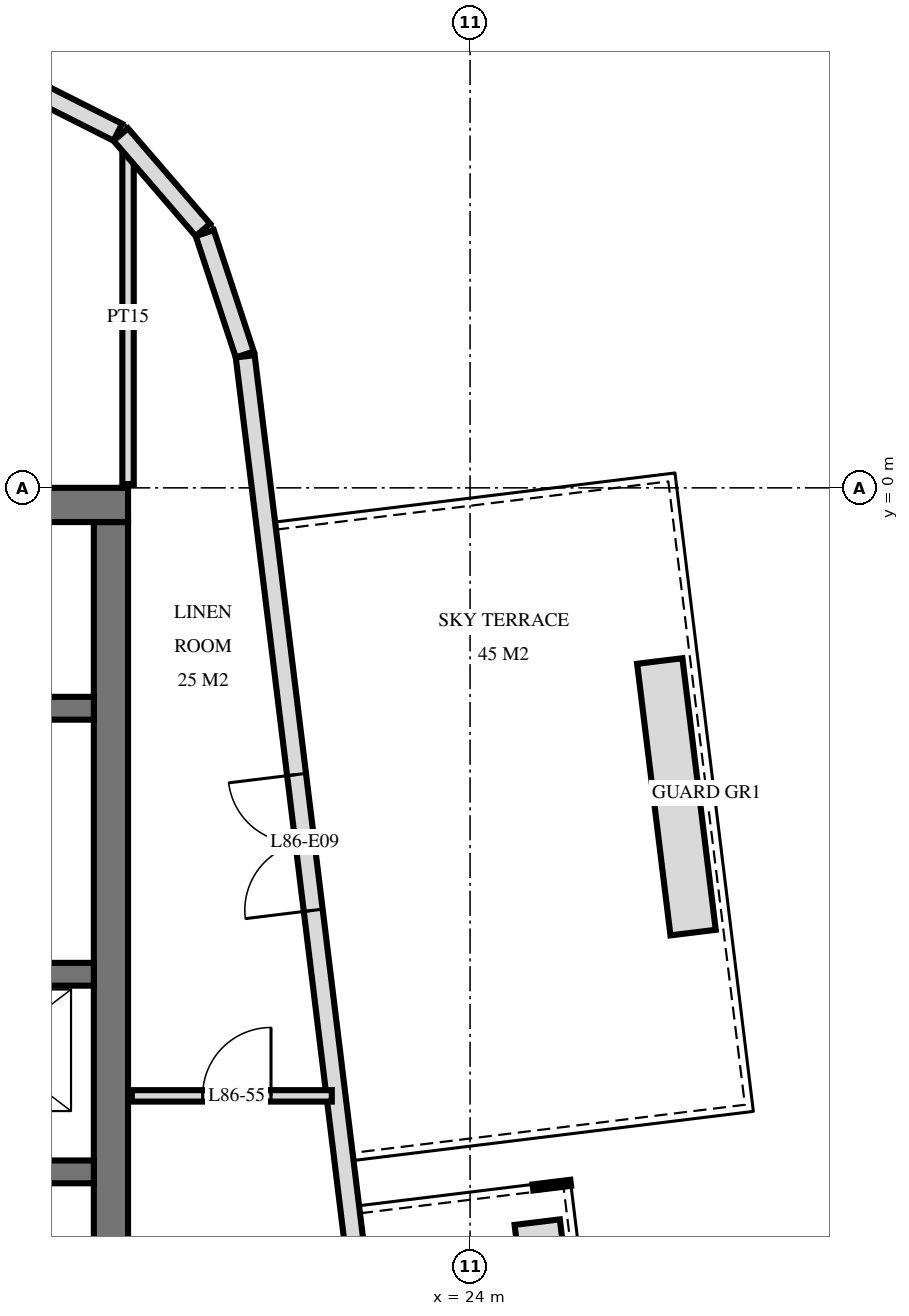
"""IFC4 building model, lengths in metres.
Left out: names, types, materials, properties, quantities, classifications, styles, units other than length and angle.
Written with IfcOpenShell. Run it as: python <this file> out.ifc"""

import sys

from ifc_helpers import new_model, si_unit, direction, frame, frame_2d, origin, place, context, subcontext, project, spatial, rectangle, extrude, element, fill, save


model = new_model("IFC4")
c1 = context("Model", 3, precision=1e-05, world=origin(), true_north=direction((0.0, 1.0)))
c2 = subcontext(c1, "Body", "Model", "MODEL_VIEW")
j1 = project(units=[si_unit("LENGTHUNIT", "METRE"), si_unit("PLANEANGLEUNIT", "RADIAN")], contexts=[c1])
p1 = place(None, origin())
s1 = spatial("IfcSite", under=j1, at=p1, CompositionType="ELEMENT")
p2 = place(p1, origin())
s2 = spatial("IfcBuilding", under=s1, at=p2, CompositionType="ELEMENT")
p3 = place(p2, frame((0.0, 0.0, 326.6)))
s3 = spatial("IfcBuildingStorey", under=s2, at=p3, CompositionType="ELEMENT", Elevation=326.6)
p4 = place(p3, frame((10.0, -0.225, 0.0), z_axis=(0.0, 0.0, 1.0), x_axis=(1.0, 0.0, 0.0)))
e1 = element("IfcWall", 1, at=p4, inside=s3, PredefinedType="SHEAR", context=c2, shape_type="SweptSolid", body=[
    extrude(rectangle(XDim=9.5, YDim=0.45, at=frame_2d((4.75, 0.0))), origin(), (0.0, 0.0, 1.0), 4.0),
])
p5 = place(p3, frame((19.275, -14.55, 0.0), z_axis=(0.0, 0.0, 1.0), x_axis=(0.0, 1.0, 0.0)))
e2 = element("IfcWall", 2, at=p5, inside=s3, PredefinedType="SHEAR", context=c2, shape_type="SweptSolid", body=[
    extrude(rectangle(XDim=14.1, YDim=0.45, at=frame_2d((7.05, 0.0))), origin(), (0.0, 0.0, 1.0), 4.0),
])
p6 = place(p3, frame((10.35, -2.9, 0.0), z_axis=(0.0, 0.0, 1.0), x_axis=(1.0, 0.0, 0.0)))
e3 = element("IfcWall", 3, at=p6, inside=s3, PredefinedType="SHEAR", context=c2, shape_type="SweptSolid", body=[
    extrude(rectangle(XDim=8.7, YDim=0.3, at=frame_2d((4.35, 0.0))), origin(), (0.0, 0.0, 1.0), 4.0),
])
p7 = place(p6, frame((0.8, 0.0, 0.0)))
e4 = element("IfcOpeningElement", 4, at=p7, cuts=e3, PredefinedType="OPENING", context=c2, shape_type="SweptSolid", body=[
    extrude(rectangle(XDim=1.1, YDim=2.1, at=frame_2d((0.55, 1.05))), frame((0.0, 0.16, 0.0), z_axis=(0.0, -1.0, 0.0), x_axis=(1.0, 0.0, 0.0)), (0.0, 0.0, 1.0), 0.32),
])
p8 = place(p6, frame((3.8, 0.0, 0.0)))
e5 = element("IfcOpeningElement", 5, at=p8, cuts=e3, PredefinedType="OPENING", context=c2, shape_type="SweptSolid", body=[
    extrude(rectangle(XDim=1.1, YDim=2.1, at=frame_2d((0.55, 1.05))), frame((0.0, 0.16, 0.0), z_axis=(0.0, -1.0, 0.0), x_axis=(1.0, 0.0, 0.0)), (0.0, 0.0, 1.0), 0.32),
])
p9 = place(p6, frame((6.9, 0.0, 0.0)))
e6 = element("IfcOpeningElement", 6, at=p9, cuts=e3, PredefinedType="OPENING", context=c2, shape_type="SweptSolid", body=[
    extrude(rectangle(XDim=0.9, YDim=2.1, at=frame_2d((0.45, 1.05))), frame((0.0, 0.16, 0.0), z_axis=(0.0, -1.0, 0.0), x_axis=(1.0, 0.0, 0.0)), (0.0, 0.0, 1.0), 0.32),
])
p10 = place(p3, frame((10.35, -6.4, 0.0), z_axis=(0.0, 0.0, 1.0), x_axis=(1.0, 0.0, 0.0)))
e7 = element("IfcWall", 7, at=p10, inside=s3, PredefinedType="SHEAR", context=c2, shape_type="SweptSolid", body=[
    extrude(rectangle(XDim=8.7, YDim=0.3, at=frame_2d((4.35, 0.0))), origin(), (0.0, 0.0, 1.0), 4.0),
])
p11 = place(p10, frame((6.8, 0.0, 0.0)))
e8 = element("IfcOpeningElement", 8, at=p11, cuts=e7, PredefinedType="OPENING", context=c2, shape_type="SweptSolid", body=[
    extrude(rectangle(XDim=1.1, YDim=2.1, at=frame_2d((0.55, 1.05))), frame((0.0, 0.16, 0.0), z_axis=(0.0, -1.0, 0.0), x_axis=(1.0, 0.0, 0.0)), (0.0, 0.0, 1.0), 0.32),
])
p12 = place(p3, frame((10.35, -9.0, 0.0), z_axis=(0.0, 0.0, 1.0), x_axis=(1.0, 0.0, 0.0)))
e9 = element("IfcWall", 9, at=p12, inside=s3, PredefinedType="SHEAR", context=c2, shape_type="SweptSolid", body=[
    extrude(rectangle(XDim=8.7, YDim=0.3, at=frame_2d((4.35, 0.0))), origin(), (0.0, 0.0, 1.0), 4.0),
])
p13 = place(p12, frame((3.8, 0.0, 0.0)))
e10 = element("IfcOpeningElement", 10, at=p13, cuts=e9, PredefinedType="OPENING", context=c2, shape_type="SweptSolid", body=[
    extrude(rectangle(XDim=1.1, YDim=2.1, at=frame_2d((0.55, 1.05))), frame((0.0, 0.16, 0.0), z_axis=(0.0, -1.0, 0.0), x_axis=(1.0, 0.0, 0.0)), (0.0, 0.0, 1.0), 0.32),
])
p14 = place(p3, frame((21.036, 1.755, 0.0), z_axis=(0.0, 0.0, 1.0), x_axis=(-0.313046160822, 0.949737911844, 0.0)))
e11 = element("IfcWall", 11, at=p14, inside=s3, PredefinedType="SOLIDWALL", context=c2, shape_type="SweptSolid", body=[
    extrude(rectangle(XDim=1.681, YDim=0.25, at=frame_2d((0.841, 0.0))), origin(), (0.0, 0.0, 1.0), 3.72),
])
for number, where, z_axis, x_axis in (
    (12, (20.485, 3.394, 0.0), (0.0, 0.0, 1.0), (-0.653, 0.758, 0.0)),
    (13, (19.366, 4.679, 0.0), (0.0, 0.0, 1.0), (-0.893, 0.45, 0.0)),
):
    element("IfcWall", number, at=place(p3, frame(where, z_axis=z_axis, x_axis=x_axis)), inside=s3, PredefinedType="SOLIDWALL", context=c2, shape_type="SweptSolid", body=[
        extrude(rectangle(XDim=1.656, YDim=0.25, at=frame_2d((0.828, 0.0))), origin(), (0.0, 0.0, 1.0), 3.72),
    ])
p15 = place(p3, frame((23.375, -17.277, 0.0), z_axis=(0.0, 0.0, 1.0), x_axis=(-0.121862878281, 0.992546945437, 0.0)))
e14 = element("IfcWall", 14, at=p15, inside=s3, PredefinedType="SOLIDWALL", context=c2, shape_type="SweptSolid", body=[
    extrude(rectangle(XDim=19.151, YDim=0.25, at=frame_2d((9.575, 0.0))), origin(), (0.0, 0.0, 1.0), 3.72),
])
p16 = place(p15, frame((2.479, 0.0, 0.0)))
e15 = element("IfcOpeningElement", 15, at=p16, cuts=e14, PredefinedType="OPENING", context=c2, shape_type="SweptSolid", body=[
    extrude(rectangle(XDim=1.8, YDim=2.4, at=frame_2d((0.9, 1.2))), frame((0.0, 0.135, 0.0), z_axis=(0.0, -1.0, 0.0), x_axis=(1.0, 0.0, 0.0)), (0.0, 0.0, 1.0), 0.27),
])
p17 = place(p15, frame((5.575, 0.0, 0.0)))
e16 = element("IfcOpeningElement", 16, at=p17, cuts=e14, PredefinedType="OPENING", context=c2, shape_type="SweptSolid", body=[
    extrude(rectangle(XDim=1.8, YDim=2.4, at=frame_2d((0.9, 1.2))), frame((0.0, 0.135, 0.0), z_axis=(0.0, -1.0, 0.0), x_axis=(1.0, 0.0, 0.0)), (0.0, 0.0, 1.0), 0.27),
])
p18 = place(p15, frame((11.807, 0.0, 0.0)))
e17 = element("IfcOpeningElement", 17, at=p18, cuts=e14, PredefinedType="OPENING", context=c2, shape_type="SweptSolid", body=[
    extrude(rectangle(XDim=1.8, YDim=2.4, at=frame_2d((0.9, 1.2))), frame((0.0, 0.135, 0.0), z_axis=(0.0, -1.0, 0.0), x_axis=(1.0, 0.0, 0.0)), (0.0, 0.0, 1.0), 0.27),
])
p19 = place(p3, frame((24.883, -9.662, 0.0), z_axis=(0.0, 0.0, 1.0), x_axis=(0.121830336845, -0.992550940267, 0.0)))
e18 = element("IfcWall", 18, at=p19, inside=s3, PredefinedType="USERDEFINED", context=c2, shape_type="SweptSolid", body=[
    extrude(rectangle(XDim=1.8, YDim=0.6, at=frame_2d((0.9, 0.0))), origin(), (0.0, 0.0, 1.0), 0.65),
])
p20 = place(p3, frame((26.496, -2.278, 0.0), z_axis=(0.0, 0.0, 1.0), x_axis=(0.121864343918, -0.992546765488, 0.0)))
e19 = element("IfcWall", 19, at=p20, inside=s3, PredefinedType="USERDEFINED", context=c2, shape_type="SweptSolid", body=[
    extrude(rectangle(XDim=3.6, YDim=0.6, at=frame_2d((1.8, 0.0))), origin(), (0.0, 0.0, 1.0), 0.65),
])
p21 = place(p3, frame((19.5, 0.05, 0.0), z_axis=(0.0, 0.0, 1.0), x_axis=(0.0, 1.0, 0.0)))
e20 = element("IfcWall", 20, at=p21, inside=s3, PredefinedType="PARTITIONING", context=c2, shape_type="SweptSolid", body=[
    extrude(rectangle(XDim=4.403, YDim=0.15, at=frame_2d((2.202, 0.0))), origin(), (0.0, 0.0, 1.0), 3.72),
])
p22 = place(p3, frame((19.55, -8.0, 0.0), z_axis=(0.0, 0.0, 1.0), x_axis=(1.0, 0.0, 0.0)))
e21 = element("IfcWall", 21, at=p22, inside=s3, PredefinedType="PARTITIONING", context=c2, shape_type="SweptSolid", body=[
    extrude(rectangle(XDim=2.631, YDim=0.15, at=frame_2d((1.315, 0.0))), origin(), (0.0, 0.0, 1.0), 3.253),
])
p23 = place(p22, frame((0.931, 0.0, 0.0)))
e22 = element("IfcOpeningElement", 22, at=p23, cuts=e21, PredefinedType="OPENING", context=c2, shape_type="SweptSolid", body=[
    extrude(rectangle(XDim=0.9, YDim=2.1, at=frame_2d((0.45, 1.05))), frame((0.0, 0.085, 0.0), z_axis=(0.0, -1.0, 0.0), x_axis=(1.0, 0.0, 0.0)), (0.0, 0.0, 1.0), 0.17),
])
p24 = place(p18, origin())
e23 = element("IfcDoor", 23, at=p24, inside=s3, OperationType="DOUBLE_DOOR_SINGLE_SWING", PredefinedType="DOOR", context=c2, shape_type="SweptSolid", body=[
    extrude(rectangle(XDim=1.8, YDim=2.4, at=frame_2d((0.9, 1.2))), frame((0.0, 0.025, 0.0), z_axis=(0.0, -1.0, 0.0), x_axis=(1.0, 0.0, 0.0)), (0.0, 0.0, 1.0), 0.05),
])
fill(e17, e23)
p25 = place(p23, origin())
e24 = element("IfcDoor", 24, at=p25, inside=s3, OperationType="SINGLE_SWING_LEFT", PredefinedType="DOOR", context=c2, shape_type="SweptSolid", body=[
    extrude(rectangle(XDim=0.9, YDim=2.1, at=frame_2d((0.45, 1.05))), frame((0.0, 0.025, 0.0), z_axis=(0.0, -1.0, 0.0), x_axis=(1.0, 0.0, 0.0)), (0.0, 0.0, 1.0), 0.05),
])
fill(e22, e24)
save(model, sys.argv[1])
